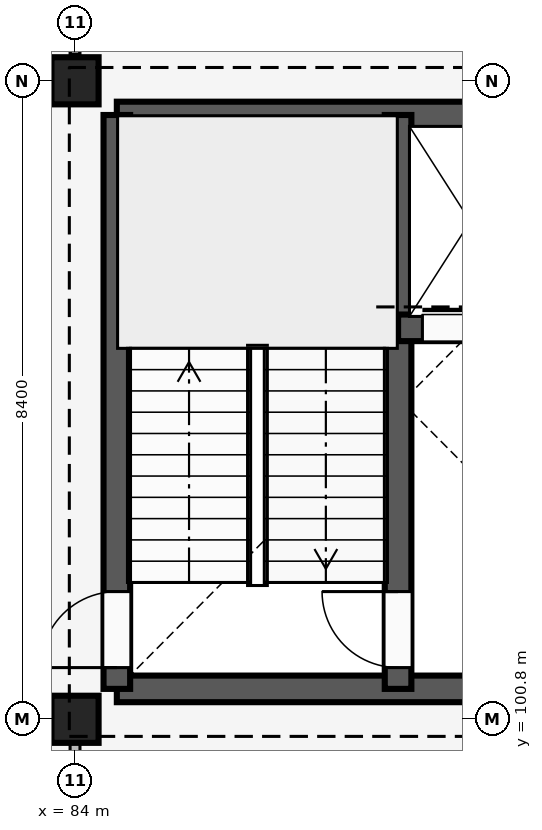
"""IFC4 building model, lengths in metres.
Left out: names, types, materials, properties, quantities, classifications, styles, units other than length and angle.
Written with IfcOpenShell. Run it as: python <this file> out.ifc"""

import sys

from ifc_helpers import new_model, si_unit, direction, frame, frame_2d, origin, origin_2d, place, context, subcontext, project, spatial, rectangle, extrude, element, fill, save


model = new_model("IFC4")
c1 = context("Model", 3, precision=1e-05, world=origin(), true_north=direction((0.0, 1.0)))
c2 = subcontext(c1, "Body", "Model", "MODEL_VIEW")
j1 = project(units=[si_unit("LENGTHUNIT", "METRE"), si_unit("PLANEANGLEUNIT", "RADIAN")], contexts=[c1])
p1 = place(None, origin())
s1 = spatial("IfcSite", under=j1, at=p1, CompositionType="ELEMENT")
p2 = place(p1, origin())
s2 = spatial("IfcBuilding", under=s1, at=p2, CompositionType="ELEMENT")
p3 = place(p2, frame((0.0, 0.0, 28.8)))
s3 = spatial("IfcBuildingStorey", under=s2, at=p3, CompositionType="ELEMENT", Elevation=28.8)
for number, where, z_axis, x_axis in (
    (1, (84.0, 100.8, 0.0), (0.0, 0.0, 1.0), (1.0, 0.0, 0.0)),
    (2, (84.0, 109.2, 0.0), (0.0, 0.0, 1.0), (1.0, 0.0, 0.0)),
):
    element("IfcColumn", number, at=place(p3, frame(where, z_axis=z_axis, x_axis=x_axis)), inside=s3, PredefinedType="COLUMN", context=c2, shape_type="SweptSolid", body=[
        extrude(rectangle(XDim=0.62, YDim=0.62, at=origin_2d()), origin(), (0.0, 0.0, 1.0), 4.2),
    ])
p4 = place(p3, frame((84.55, 101.2, 0.0), z_axis=(0.0, 0.0, 1.0), x_axis=(1.0, 0.0, 0.0)))
e3 = element("IfcWall", 3, at=p4, inside=s3, PredefinedType="SHEAR", context=c2, shape_type="SweptSolid", body=[
    extrude(rectangle(XDim=7.5, YDim=0.35, at=frame_2d((3.75, 0.0))), origin(), (0.0, 0.0, 1.0), 3.94),
])
p5 = place(p4, frame((4.85, 0.0, 0.0)))
e4 = element("IfcOpeningElement", 4, at=p5, cuts=e3, PredefinedType="OPENING", context=c2, shape_type="SweptSolid", body=[
    extrude(rectangle(XDim=1.2, YDim=2.2, at=frame_2d((0.6, 1.1))), frame((0.0, 0.185, 0.0), z_axis=(0.0, -1.0, 0.0), x_axis=(1.0, 0.0, 0.0)), (0.0, 0.0, 1.0), 0.37),
])
p6 = place(p3, frame((84.55, 108.75, 0.0), z_axis=(0.0, 0.0, 1.0), x_axis=(1.0, 0.0, 0.0)))
e5 = element("IfcWall", 5, at=p6, inside=s3, PredefinedType="SHEAR", context=c2, shape_type="SweptSolid", body=[
    extrude(rectangle(XDim=7.5, YDim=0.35, at=frame_2d((3.75, 0.0))), origin(), (0.0, 0.0, 1.0), 3.94),
])
p7 = place(p3, frame((84.55, 101.2, 0.0), z_axis=(0.0, 0.0, 1.0), x_axis=(0.0, 1.0, 0.0)))
e6 = element("IfcWall", 6, at=p7, inside=s3, PredefinedType="SHEAR", context=c2, shape_type="SweptSolid", body=[
    extrude(rectangle(XDim=7.55, YDim=0.35, at=frame_2d((3.775, 0.0))), origin(), (0.0, 0.0, 1.0), 3.94),
])
p8 = place(p7, frame((0.28, 0.0, 0.0)))
e7 = element("IfcOpeningElement", 7, at=p8, cuts=e6, PredefinedType="OPENING", context=c2, shape_type="SweptSolid", body=[
    extrude(rectangle(XDim=1.0, YDim=2.15, at=frame_2d((0.5, 1.075))), frame((0.0, 0.185, 0.0), z_axis=(0.0, -1.0, 0.0), x_axis=(1.0, 0.0, 0.0)), (0.0, 0.0, 1.0), 0.37),
])
p9 = place(p3, frame((88.25, 101.2, 0.0), z_axis=(0.0, 0.0, 1.0), x_axis=(0.0, 1.0, 0.0)))
e8 = element("IfcWall", 8, at=p9, inside=s3, PredefinedType="SHEAR", context=c2, shape_type="SweptSolid", body=[
    extrude(rectangle(XDim=7.55, YDim=0.35, at=frame_2d((3.775, 0.0))), origin(), (0.0, 0.0, 1.0), 3.94),
])
p10 = place(p9, frame((0.28, 0.0, 0.0)))
e9 = element("IfcOpeningElement", 9, at=p10, cuts=e8, PredefinedType="OPENING", context=c2, shape_type="SweptSolid", body=[
    extrude(rectangle(XDim=1.0, YDim=2.15, at=frame_2d((0.5, 1.075))), frame((0.0, 0.185, 0.0), z_axis=(0.0, -1.0, 0.0), x_axis=(1.0, 0.0, 0.0)), (0.0, 0.0, 1.0), 0.37),
])
p11 = place(p3, frame((88.25, 105.95, 0.0), z_axis=(0.0, 0.0, 1.0), x_axis=(1.0, 0.0, 0.0)))
e10 = element("IfcWall", 10, at=p11, inside=s3, PredefinedType="SHEAR", context=c2, shape_type="SweptSolid", body=[
    extrude(rectangle(XDim=3.8, YDim=0.35, at=frame_2d((1.9, 0.0))), origin(), (0.0, 0.0, 1.0), 3.94),
])
p12 = place(p11, frame((0.32, 0.0, 0.0)))
e11 = element("IfcOpeningElement", 11, at=p12, cuts=e10, PredefinedType="OPENING", context=c2, shape_type="SweptSolid", body=[
    extrude(rectangle(XDim=1.35, YDim=2.25, at=frame_2d((0.675, 1.125))), frame((0.0, 0.185, 0.0), z_axis=(0.0, -1.0, 0.0), x_axis=(1.0, 0.0, 0.0)), (0.0, 0.0, 1.0), 0.37),
])
p13 = place(p11, frame((2.04, 0.0, 0.0)))
e12 = element("IfcOpeningElement", 12, at=p13, cuts=e10, PredefinedType="OPENING", context=c2, shape_type="SweptSolid", body=[
    extrude(rectangle(XDim=1.4, YDim=2.25, at=frame_2d((0.7, 1.125))), frame((0.0, 0.185, 0.0), z_axis=(0.0, -1.0, 0.0), x_axis=(1.0, 0.0, 0.0)), (0.0, 0.0, 1.0), 0.37),
])
p14 = place(p3, frame((84.0, 92.54, 0.0), z_axis=(0.0, 0.0, 1.0), x_axis=(0.0, 1.0, 0.0)))
e13 = element("IfcWall", 13, at=p14, inside=s3, PredefinedType="PARTITIONING", context=c2, shape_type="SweptSolid", body=[
    extrude(rectangle(XDim=8.21, YDim=0.13, at=frame_2d((4.105, 0.0))), origin(), (0.0, 0.0, 1.0), 3.32),
])
p15 = place(p14, frame((3.64, 0.0, 0.0)))
e14 = element("IfcOpeningElement", 14, at=p15, cuts=e13, PredefinedType="OPENING", context=c2, shape_type="SweptSolid", body=[
    extrude(rectangle(XDim=1.08, YDim=2.15, at=frame_2d((0.54, 1.075))), frame((0.0, 0.075, 0.0), z_axis=(0.0, -1.0, 0.0), x_axis=(1.0, 0.0, 0.0)), (0.0, 0.0, 1.0), 0.15),
])
p16 = place(p3, frame((84.0, 109.55, 0.0), z_axis=(0.0, 0.0, 1.0), x_axis=(0.0, 1.0, 0.0)))
e15 = element("IfcWall", 15, at=p16, inside=s3, PredefinedType="PARTITIONING", context=c2, shape_type="SweptSolid", body=[
    extrude(rectangle(XDim=7.91, YDim=0.13, at=frame_2d((3.955, 0.0))), origin(), (0.0, 0.0, 1.0), 3.32),
])
p17 = place(p16, frame((3.4, 0.0, 0.0)))
e16 = element("IfcOpeningElement", 16, at=p17, cuts=e15, PredefinedType="OPENING", context=c2, shape_type="SweptSolid", body=[
    extrude(rectangle(XDim=1.05, YDim=2.2, at=frame_2d((0.525, 1.1))), frame((0.0, 0.075, 0.0), z_axis=(0.0, -1.0, 0.0), x_axis=(1.0, 0.0, 0.0)), (0.0, 0.0, 1.0), 0.15),
])
p18 = place(p8, origin())
e17 = element("IfcDoor", 17, at=p18, inside=s3, OperationType="SINGLE_SWING_LEFT", PredefinedType="DOOR", context=c2, shape_type="SweptSolid", body=[
    extrude(rectangle(XDim=1.0, YDim=2.15, at=frame_2d((0.5, 1.075))), frame((0.0, 0.025, 0.0), z_axis=(0.0, -1.0, 0.0), x_axis=(1.0, 0.0, 0.0)), (0.0, 0.0, 1.0), 0.05),
])
fill(e7, e17)
p19 = place(p10, origin())
e18 = element("IfcDoor", 18, at=p19, inside=s3, OperationType="SINGLE_SWING_RIGHT", PredefinedType="DOOR", context=c2, shape_type="SweptSolid", body=[
    extrude(rectangle(XDim=1.0, YDim=2.15, at=frame_2d((0.5, 1.075))), frame((0.0, 0.025, 0.0), z_axis=(0.0, -1.0, 0.0), x_axis=(1.0, 0.0, 0.0)), (0.0, 0.0, 1.0), 0.05),
])
fill(e9, e18)
p20 = place(p12, origin())
e19 = element("IfcDoor", 19, at=p20, inside=s3, OperationType="SLIDING_TO_LEFT", PredefinedType="DOOR", context=c2, shape_type="SweptSolid", body=[
    extrude(rectangle(XDim=1.35, YDim=2.25, at=frame_2d((0.675, 1.125))), frame((0.0, 0.025, 0.0), z_axis=(0.0, -1.0, 0.0), x_axis=(1.0, 0.0, 0.0)), (0.0, 0.0, 1.0), 0.05),
])
fill(e11, e19)
save(model, sys.argv[1])
